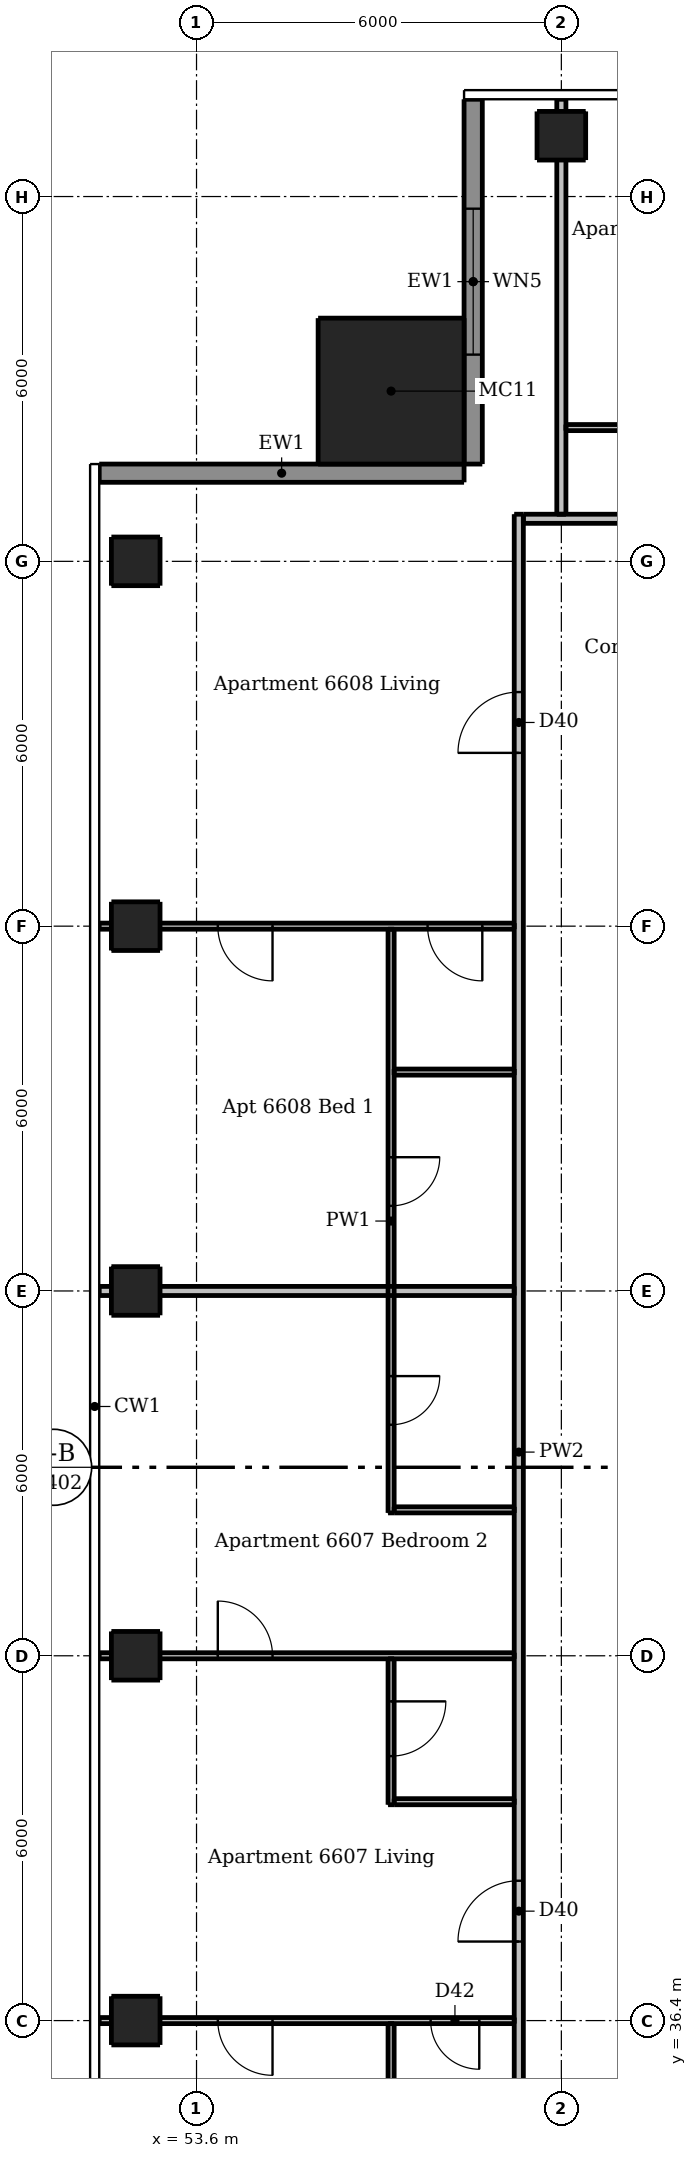
"""IFC4 building model, lengths in metres.
Left out: names, types, materials, properties, quantities, classifications, styles, units other than length and angle.
Written with IfcOpenShell. Run it as: python <this file> out.ifc"""

import sys

from ifc_helpers import new_model, si_unit, direction, frame, frame_2d, origin, origin_2d, place, context, subcontext, project, spatial, rectangle, extrude, element, fill, save


model = new_model("IFC4")
c1 = context("Model", 3, precision=1e-05, world=origin(), true_north=direction((0.0, 1.0)))
c2 = subcontext(c1, "Body", "Model", "MODEL_VIEW")
j1 = project(units=[si_unit("LENGTHUNIT", "METRE"), si_unit("PLANEANGLEUNIT", "RADIAN")], contexts=[c1])
p1 = place(None, origin())
s1 = spatial("IfcSite", under=j1, at=p1, CompositionType="ELEMENT")
p2 = place(p1, origin())
s2 = spatial("IfcBuilding", under=s1, at=p2, CompositionType="ELEMENT")
p3 = place(p2, frame((0.0, 0.0, 248.8)))
s3 = spatial("IfcBuildingStorey", under=s2, at=p3, CompositionType="ELEMENT", Elevation=248.8)
for number, where, z_axis, x_axis in (
    (1, (59.6, 67.4, 0.0), (0.0, 0.0, 1.0), (1.0, 0.0, 0.0)),
    (2, (52.6, 36.4, 0.0), (0.0, 0.0, 1.0), (1.0, 0.0, 0.0)),
    (3, (52.6, 42.4, 0.0), (0.0, 0.0, 1.0), (1.0, 0.0, 0.0)),
    (4, (52.6, 48.4, 0.0), (0.0, 0.0, 1.0), (1.0, 0.0, 0.0)),
    (5, (52.6, 54.4, 0.0), (0.0, 0.0, 1.0), (1.0, 0.0, 0.0)),
    (6, (52.6, 60.4, 0.0), (0.0, 0.0, 1.0), (1.0, 0.0, 0.0)),
):
    element("IfcColumn", number, at=place(p3, frame(where, z_axis=z_axis, x_axis=x_axis)), inside=s3, PredefinedType="COLUMN", context=c2, shape_type="SweptSolid", body=[
        extrude(rectangle(XDim=0.8, YDim=0.8, at=origin_2d()), origin(), (0.0, 0.0, 1.0), 3.05),
    ])
p4 = place(p3, frame((56.8, 63.2, 0.0), z_axis=(0.0, 0.0, 1.0), x_axis=(1.0, 0.0, 0.0)))
e7 = element("IfcColumn", 7, at=p4, inside=s3, PredefinedType="COLUMN", context=c2, shape_type="SweptSolid", body=[
    extrude(rectangle(XDim=2.4, YDim=2.4, at=origin_2d()), origin(), (0.0, 0.0, 1.0), 3.3),
])
p5 = place(p3, frame((58.15, 68.0, 0.0), z_axis=(0.0, 0.0, 1.0), x_axis=(0.0, -1.0, 0.0)))
e8 = element("IfcWall", 8, at=p5, inside=s3, PredefinedType="SOLIDWALL", context=c2, shape_type="SweptSolid", body=[
    extrude(rectangle(XDim=6.0, YDim=0.3, at=frame_2d((3.0, 0.0))), origin(), (0.0, 0.0, 1.0), 3.05),
])
p6 = place(p5, frame((1.8, 0.0, 0.15)))
e9 = element("IfcOpeningElement", 9, at=p6, cuts=e8, PredefinedType="OPENING", context=c2, shape_type="SweptSolid", body=[
    extrude(rectangle(XDim=2.4, YDim=2.1, at=frame_2d((1.2, 1.05))), frame((0.0, 0.16, 0.0), z_axis=(0.0, -1.0, 0.0), x_axis=(1.0, 0.0, 0.0)), (0.0, 0.0, 1.0), 0.32),
])
p7 = place(p3, frame((58.0, 61.85, 0.0), z_axis=(0.0, 0.0, 1.0), x_axis=(-1.0, 0.0, 0.0)))
e10 = element("IfcWall", 10, at=p7, inside=s3, PredefinedType="SOLIDWALL", context=c2, shape_type="SweptSolid", body=[
    extrude(rectangle(XDim=6.0, YDim=0.3, at=frame_2d((3.0, 0.0))), origin(), (0.0, 0.0, 1.0), 3.05),
])
p8 = place(p3, frame((56.8, 32.75, 0.0), z_axis=(0.0, 0.0, 1.0), x_axis=(0.0, 1.0, 0.0)))
e11 = element("IfcWall", 11, at=p8, inside=s3, PredefinedType="PARTITIONING", context=c2, shape_type="SweptSolid", body=[
    extrude(rectangle(XDim=3.6, YDim=0.1, at=frame_2d((1.8, 0.0))), origin(), (0.0, 0.0, 1.0), 3.05),
])
p9 = place(p3, frame((56.8, 42.35, 0.0), z_axis=(0.0, 0.0, 1.0), x_axis=(0.0, -1.0, 0.0)))
e12 = element("IfcWall", 12, at=p9, inside=s3, PredefinedType="PARTITIONING", context=c2, shape_type="SweptSolid", body=[
    extrude(rectangle(XDim=2.4, YDim=0.1, at=frame_2d((1.2, 0.0))), origin(), (0.0, 0.0, 1.0), 3.05),
])
p10 = place(p9, frame((0.7, 0.0, 0.0)))
e13 = element("IfcOpeningElement", 13, at=p10, cuts=e12, PredefinedType="OPENING", context=c2, shape_type="SweptSolid", body=[
    extrude(rectangle(XDim=0.9, YDim=2.1, at=frame_2d((0.45, 1.05))), frame((0.0, 0.06, 0.0), z_axis=(0.0, -1.0, 0.0), x_axis=(1.0, 0.0, 0.0)), (0.0, 0.0, 1.0), 0.12),
])
p11 = place(p3, frame((56.8, 54.35, 0.0), z_axis=(0.0, 0.0, 1.0), x_axis=(0.0, -1.0, 0.0)))
e14 = element("IfcWall", 14, at=p11, inside=s3, PredefinedType="PARTITIONING", context=c2, shape_type="SweptSolid", body=[
    extrude(rectangle(XDim=9.6, YDim=0.1, at=frame_2d((4.8, 0.0))), origin(), (0.0, 0.0, 1.0), 3.05),
])
p12 = place(p11, frame((7.35, 0.0, 0.0)))
e15 = element("IfcOpeningElement", 15, at=p12, cuts=e14, PredefinedType="OPENING", context=c2, shape_type="SweptSolid", body=[
    extrude(rectangle(XDim=0.8, YDim=2.1, at=frame_2d((0.4, 1.05))), frame((0.0, 0.06, 0.0), z_axis=(0.0, -1.0, 0.0), x_axis=(1.0, 0.0, 0.0)), (0.0, 0.0, 1.0), 0.12),
])
p13 = place(p11, frame((3.75, 0.0, 0.0)))
e16 = element("IfcOpeningElement", 16, at=p13, cuts=e14, PredefinedType="OPENING", context=c2, shape_type="SweptSolid", body=[
    extrude(rectangle(XDim=0.8, YDim=2.1, at=frame_2d((0.4, 1.05))), frame((0.0, 0.06, 0.0), z_axis=(0.0, -1.0, 0.0), x_axis=(1.0, 0.0, 0.0)), (0.0, 0.0, 1.0), 0.12),
])
p14 = place(p3, frame((59.675, 62.6, 0.0), z_axis=(0.0, 0.0, 1.0), x_axis=(1.0, 0.0, 0.0)))
e17 = element("IfcWall", 17, at=p14, inside=s3, PredefinedType="PARTITIONING", context=c2, shape_type="SweptSolid", body=[
    extrude(rectangle(XDim=17.85, YDim=0.1, at=frame_2d((8.925, 0.0))), origin(), (0.0, 0.0, 1.0), 3.05),
])
p15 = place(p14, frame((12.375, 0.0, 0.0)))
e18 = element("IfcOpeningElement", 18, at=p15, cuts=e17, PredefinedType="OPENING", context=c2, shape_type="SweptSolid", body=[
    extrude(rectangle(XDim=0.9, YDim=2.1, at=frame_2d((0.45, 1.05))), frame((0.0, 0.06, 0.0), z_axis=(0.0, -1.0, 0.0), x_axis=(1.0, 0.0, 0.0)), (0.0, 0.0, 1.0), 0.12),
])
p16 = place(p14, frame((16.275, 0.0, 0.0)))
e19 = element("IfcOpeningElement", 19, at=p16, cuts=e17, PredefinedType="OPENING", context=c2, shape_type="SweptSolid", body=[
    extrude(rectangle(XDim=0.9, YDim=2.1, at=frame_2d((0.45, 1.05))), frame((0.0, 0.06, 0.0), z_axis=(0.0, -1.0, 0.0), x_axis=(1.0, 0.0, 0.0)), (0.0, 0.0, 1.0), 0.12),
])
p17 = place(p14, frame((14.175, 0.0, 0.0)))
e20 = element("IfcOpeningElement", 20, at=p17, cuts=e17, PredefinedType="OPENING", context=c2, shape_type="SweptSolid", body=[
    extrude(rectangle(XDim=0.9, YDim=2.1, at=frame_2d((0.45, 1.05))), frame((0.0, 0.06, 0.0), z_axis=(0.0, -1.0, 0.0), x_axis=(1.0, 0.0, 0.0)), (0.0, 0.0, 1.0), 0.12),
])
p18 = place(p14, frame((1.275, 0.0, 0.0)))
e21 = element("IfcOpeningElement", 21, at=p18, cuts=e17, PredefinedType="OPENING", context=c2, shape_type="SweptSolid", body=[
    extrude(rectangle(XDim=0.9, YDim=2.1, at=frame_2d((0.45, 1.05))), frame((0.0, 0.06, 0.0), z_axis=(0.0, -1.0, 0.0), x_axis=(1.0, 0.0, 0.0)), (0.0, 0.0, 1.0), 0.12),
])
p19 = place(p14, frame((7.275, 0.0, 0.0)))
e22 = element("IfcOpeningElement", 22, at=p19, cuts=e17, PredefinedType="OPENING", context=c2, shape_type="SweptSolid", body=[
    extrude(rectangle(XDim=0.9, YDim=2.1, at=frame_2d((0.45, 1.05))), frame((0.0, 0.06, 0.0), z_axis=(0.0, -1.0, 0.0), x_axis=(1.0, 0.0, 0.0)), (0.0, 0.0, 1.0), 0.12),
])
p20 = place(p14, frame((4.325, 0.0, 0.0)))
e23 = element("IfcOpeningElement", 23, at=p20, cuts=e17, PredefinedType="OPENING", context=c2, shape_type="SweptSolid", body=[
    extrude(rectangle(XDim=0.8, YDim=2.1, at=frame_2d((0.4, 1.05))), frame((0.0, 0.06, 0.0), z_axis=(0.0, -1.0, 0.0), x_axis=(1.0, 0.0, 0.0)), (0.0, 0.0, 1.0), 0.12),
])
p21 = place(p14, frame((10.325, 0.0, 0.0)))
e24 = element("IfcOpeningElement", 24, at=p21, cuts=e17, PredefinedType="OPENING", context=c2, shape_type="SweptSolid", body=[
    extrude(rectangle(XDim=0.8, YDim=2.1, at=frame_2d((0.4, 1.05))), frame((0.0, 0.06, 0.0), z_axis=(0.0, -1.0, 0.0), x_axis=(1.0, 0.0, 0.0)), (0.0, 0.0, 1.0), 0.12),
])
p22 = place(p3, frame((58.825, 54.4, 0.0), z_axis=(0.0, 0.0, 1.0), x_axis=(-1.0, 0.0, 0.0)))
e25 = element("IfcWall", 25, at=p22, inside=s3, PredefinedType="PARTITIONING", context=c2, shape_type="SweptSolid", body=[
    extrude(rectangle(XDim=6.825, YDim=0.1, at=frame_2d((3.413, 0.0))), origin(), (0.0, 0.0, 1.0), 2.516),
])
p23 = place(p22, frame((0.525, 0.0, 0.0)))
e26 = element("IfcOpeningElement", 26, at=p23, cuts=e25, PredefinedType="OPENING", context=c2, shape_type="SweptSolid", body=[
    extrude(rectangle(XDim=0.9, YDim=2.1, at=frame_2d((0.45, 1.05))), frame((0.0, 0.06, 0.0), z_axis=(0.0, -1.0, 0.0), x_axis=(1.0, 0.0, 0.0)), (0.0, 0.0, 1.0), 0.12),
])
p24 = place(p22, frame((3.975, 0.0, 0.0)))
e27 = element("IfcOpeningElement", 27, at=p24, cuts=e25, PredefinedType="OPENING", context=c2, shape_type="SweptSolid", body=[
    extrude(rectangle(XDim=0.9, YDim=2.1, at=frame_2d((0.45, 1.05))), frame((0.0, 0.06, 0.0), z_axis=(0.0, -1.0, 0.0), x_axis=(1.0, 0.0, 0.0)), (0.0, 0.0, 1.0), 0.12),
])
for number, where, z_axis, x_axis in (
    (28, (56.85, 52.0, 0.0), (0.0, 0.0, 1.0), (1.0, 0.0, 0.0)),
    (29, (56.85, 44.8, 0.0), (0.0, 0.0, 1.0), (1.0, 0.0, 0.0)),
):
    element("IfcWall", number, at=place(p3, frame(where, z_axis=z_axis, x_axis=x_axis)), inside=s3, PredefinedType="PARTITIONING", context=c2, shape_type="SweptSolid", body=[
        extrude(rectangle(XDim=1.975, YDim=0.1, at=frame_2d((0.987, 0.0))), origin(), (0.0, 0.0, 1.0), 3.05),
    ])
p25 = place(p3, frame((52.0, 42.4, 0.0), z_axis=(0.0, 0.0, 1.0), x_axis=(1.0, 0.0, 0.0)))
e30 = element("IfcWall", 30, at=p25, inside=s3, PredefinedType="PARTITIONING", context=c2, shape_type="SweptSolid", body=[
    extrude(rectangle(XDim=6.825, YDim=0.1, at=frame_2d((3.413, 0.0))), origin(), (0.0, 0.0, 1.0), 2.516),
])
p26 = place(p25, frame((1.95, 0.0, 0.0)))
e31 = element("IfcOpeningElement", 31, at=p26, cuts=e30, PredefinedType="OPENING", context=c2, shape_type="SweptSolid", body=[
    extrude(rectangle(XDim=0.9, YDim=2.1, at=frame_2d((0.45, 1.05))), frame((0.0, 0.06, 0.0), z_axis=(0.0, -1.0, 0.0), x_axis=(1.0, 0.0, 0.0)), (0.0, 0.0, 1.0), 0.12),
])
p27 = place(p3, frame((56.85, 40.0, 0.0), z_axis=(0.0, 0.0, 1.0), x_axis=(1.0, 0.0, 0.0)))
e32 = element("IfcWall", 32, at=p27, inside=s3, PredefinedType="PARTITIONING", context=c2, shape_type="SweptSolid", body=[
    extrude(rectangle(XDim=1.975, YDim=0.1, at=frame_2d((0.987, 0.0))), origin(), (0.0, 0.0, 1.0), 3.05),
])
p28 = place(p3, frame((58.825, 36.4, 0.0), z_axis=(0.0, 0.0, 1.0), x_axis=(-1.0, 0.0, 0.0)))
e33 = element("IfcWall", 33, at=p28, inside=s3, PredefinedType="PARTITIONING", context=c2, shape_type="SweptSolid", body=[
    extrude(rectangle(XDim=6.825, YDim=0.1, at=frame_2d((3.413, 0.0))), origin(), (0.0, 0.0, 1.0), 2.516),
])
p29 = place(p28, frame((3.975, 0.0, 0.0)))
e34 = element("IfcOpeningElement", 34, at=p29, cuts=e33, PredefinedType="OPENING", context=c2, shape_type="SweptSolid", body=[
    extrude(rectangle(XDim=0.9, YDim=2.1, at=frame_2d((0.45, 1.05))), frame((0.0, 0.06, 0.0), z_axis=(0.0, -1.0, 0.0), x_axis=(1.0, 0.0, 0.0)), (0.0, 0.0, 1.0), 0.12),
])
p30 = place(p28, frame((0.575, 0.0, 0.0)))
e35 = element("IfcOpeningElement", 35, at=p30, cuts=e33, PredefinedType="OPENING", context=c2, shape_type="SweptSolid", body=[
    extrude(rectangle(XDim=0.8, YDim=2.1, at=frame_2d((0.4, 1.05))), frame((0.0, 0.06, 0.0), z_axis=(0.0, -1.0, 0.0), x_axis=(1.0, 0.0, 0.0)), (0.0, 0.0, 1.0), 0.12),
])
p31 = place(p3, frame((58.9, 30.325, 0.0), z_axis=(0.0, 0.0, 1.0), x_axis=(0.0, 1.0, 0.0)))
e36 = element("IfcWall", 36, at=p31, inside=s3, PredefinedType="PARTITIONING", context=c2, shape_type="SweptSolid", body=[
    extrude(rectangle(XDim=30.85, YDim=0.15, at=frame_2d((15.425, 0.0))), origin(), (0.0, 0.0, 1.0), 3.05),
])
p32 = place(p31, frame((7.375, 0.0, 0.0)))
e37 = element("IfcOpeningElement", 37, at=p32, cuts=e36, PredefinedType="OPENING", context=c2, shape_type="SweptSolid", body=[
    extrude(rectangle(XDim=1.0, YDim=2.1, at=frame_2d((0.5, 1.05))), frame((0.0, 0.085, 0.0), z_axis=(0.0, -1.0, 0.0), x_axis=(1.0, 0.0, 0.0)), (0.0, 0.0, 1.0), 0.17),
])
p33 = place(p31, frame((26.925, 0.0, 0.0)))
e38 = element("IfcOpeningElement", 38, at=p33, cuts=e36, PredefinedType="OPENING", context=c2, shape_type="SweptSolid", body=[
    extrude(rectangle(XDim=1.0, YDim=2.1, at=frame_2d((0.5, 1.05))), frame((0.0, 0.085, 0.0), z_axis=(0.0, -1.0, 0.0), x_axis=(1.0, 0.0, 0.0)), (0.0, 0.0, 1.0), 0.17),
])
p34 = place(p3, frame((59.6, 61.175, 0.0), z_axis=(0.0, 0.0, 1.0), x_axis=(0.0, 1.0, 0.0)))
e39 = element("IfcWall", 39, at=p34, inside=s3, PredefinedType="PARTITIONING", context=c2, shape_type="SweptSolid", body=[
    extrude(rectangle(XDim=6.825, YDim=0.15, at=frame_2d((3.413, 0.0))), origin(), (0.0, 0.0, 1.0), 2.51),
])
p35 = place(p3, frame((58.975, 61.1, 0.0), z_axis=(0.0, 0.0, 1.0), x_axis=(1.0, 0.0, 0.0)))
e40 = element("IfcWall", 40, at=p35, inside=s3, PredefinedType="PARTITIONING", context=c2, shape_type="SweptSolid", body=[
    extrude(rectangle(XDim=29.25, YDim=0.15, at=frame_2d((14.625, 0.0))), origin(), (0.0, 0.0, 1.0), 3.05),
])
p36 = place(p35, frame((9.125, 0.0, 0.0)))
e41 = element("IfcOpeningElement", 41, at=p36, cuts=e40, PredefinedType="OPENING", context=c2, shape_type="SweptSolid", body=[
    extrude(rectangle(XDim=1.0, YDim=2.1, at=frame_2d((0.5, 1.05))), frame((0.0, 0.085, 0.0), z_axis=(0.0, -1.0, 0.0), x_axis=(1.0, 0.0, 0.0)), (0.0, 0.0, 1.0), 0.17),
])
p37 = place(p35, frame((26.475, 0.0, 0.0)))
e42 = element("IfcOpeningElement", 42, at=p37, cuts=e40, PredefinedType="OPENING", context=c2, shape_type="SweptSolid", body=[
    extrude(rectangle(XDim=1.0, YDim=2.1, at=frame_2d((0.5, 1.05))), frame((0.0, 0.085, 0.0), z_axis=(0.0, -1.0, 0.0), x_axis=(1.0, 0.0, 0.0)), (0.0, 0.0, 1.0), 0.17),
])
p38 = place(p3, frame((52.0, 48.4, 0.0), z_axis=(0.0, 0.0, 1.0), x_axis=(1.0, 0.0, 0.0)))
e43 = element("IfcWall", 43, at=p38, inside=s3, PredefinedType="PARTITIONING", context=c2, shape_type="SweptSolid", body=[
    extrude(rectangle(XDim=6.825, YDim=0.15, at=frame_2d((3.413, 0.0))), origin(), (0.0, 0.0, 1.0), 2.516),
])
p39 = place(p6, origin())
e44 = element("IfcWindow", 44, at=p39, inside=s3, PartitioningType="DOUBLE_PANEL_VERTICAL", PredefinedType="WINDOW", context=c2, shape_type="SweptSolid", body=[
    extrude(rectangle(XDim=2.4, YDim=2.1, at=frame_2d((1.2, 1.05))), frame((0.0, 0.03, 0.0), z_axis=(0.0, -1.0, 0.0), x_axis=(1.0, 0.0, 0.0)), (0.0, 0.0, 1.0), 0.06),
])
fill(e9, e44)
p40 = place(p32, origin())
e45 = element("IfcDoor", 45, at=p40, inside=s3, OperationType="SINGLE_SWING_LEFT", PredefinedType="DOOR", context=c2, shape_type="SweptSolid", body=[
    extrude(rectangle(XDim=1.0, YDim=2.1, at=frame_2d((0.5, 1.05))), frame((0.0, 0.025, 0.0), z_axis=(0.0, -1.0, 0.0), x_axis=(1.0, 0.0, 0.0)), (0.0, 0.0, 1.0), 0.05),
])
fill(e37, e45)
p41 = place(p10, origin())
e46 = element("IfcDoor", 46, at=p41, inside=s3, OperationType="SINGLE_SWING_LEFT", PredefinedType="DOOR", context=c2, shape_type="SweptSolid", body=[
    extrude(rectangle(XDim=0.9, YDim=2.1, at=frame_2d((0.45, 1.05))), frame((0.0, 0.025, 0.0), z_axis=(0.0, -1.0, 0.0), x_axis=(1.0, 0.0, 0.0)), (0.0, 0.0, 1.0), 0.05),
])
fill(e13, e46)
p42 = place(p29, origin())
e47 = element("IfcDoor", 47, at=p42, inside=s3, OperationType="SINGLE_SWING_LEFT", PredefinedType="DOOR", context=c2, shape_type="SweptSolid", body=[
    extrude(rectangle(XDim=0.9, YDim=2.1, at=frame_2d((0.45, 1.05))), frame((0.0, 0.025, 0.0), z_axis=(0.0, -1.0, 0.0), x_axis=(1.0, 0.0, 0.0)), (0.0, 0.0, 1.0), 0.05),
])
fill(e34, e47)
p43 = place(p30, origin())
e48 = element("IfcDoor", 48, at=p43, inside=s3, OperationType="SINGLE_SWING_LEFT", PredefinedType="DOOR", context=c2, shape_type="SweptSolid", body=[
    extrude(rectangle(XDim=0.8, YDim=2.1, at=frame_2d((0.4, 1.05))), frame((0.0, 0.025, 0.0), z_axis=(0.0, -1.0, 0.0), x_axis=(1.0, 0.0, 0.0)), (0.0, 0.0, 1.0), 0.05),
])
fill(e35, e48)
p44 = place(p26, origin())
e49 = element("IfcDoor", 49, at=p44, inside=s3, OperationType="SINGLE_SWING_LEFT", PredefinedType="DOOR", context=c2, shape_type="SweptSolid", body=[
    extrude(rectangle(XDim=0.9, YDim=2.1, at=frame_2d((0.45, 1.05))), frame((0.0, 0.025, 0.0), z_axis=(0.0, -1.0, 0.0), x_axis=(1.0, 0.0, 0.0)), (0.0, 0.0, 1.0), 0.05),
])
fill(e31, e49)
p45 = place(p12, origin())
e50 = element("IfcDoor", 50, at=p45, inside=s3, OperationType="SINGLE_SWING_LEFT", PredefinedType="DOOR", context=c2, shape_type="SweptSolid", body=[
    extrude(rectangle(XDim=0.8, YDim=2.1, at=frame_2d((0.4, 1.05))), frame((0.0, 0.025, 0.0), z_axis=(0.0, -1.0, 0.0), x_axis=(1.0, 0.0, 0.0)), (0.0, 0.0, 1.0), 0.05),
])
fill(e15, e50)
p46 = place(p33, origin())
e51 = element("IfcDoor", 51, at=p46, inside=s3, OperationType="SINGLE_SWING_LEFT", PredefinedType="DOOR", context=c2, shape_type="SweptSolid", body=[
    extrude(rectangle(XDim=1.0, YDim=2.1, at=frame_2d((0.5, 1.05))), frame((0.0, 0.025, 0.0), z_axis=(0.0, -1.0, 0.0), x_axis=(1.0, 0.0, 0.0)), (0.0, 0.0, 1.0), 0.05),
])
fill(e38, e51)
p47 = place(p23, origin())
e52 = element("IfcDoor", 52, at=p47, inside=s3, OperationType="SINGLE_SWING_LEFT", PredefinedType="DOOR", context=c2, shape_type="SweptSolid", body=[
    extrude(rectangle(XDim=0.9, YDim=2.1, at=frame_2d((0.45, 1.05))), frame((0.0, 0.025, 0.0), z_axis=(0.0, -1.0, 0.0), x_axis=(1.0, 0.0, 0.0)), (0.0, 0.0, 1.0), 0.05),
])
fill(e26, e52)
p48 = place(p24, origin())
e53 = element("IfcDoor", 53, at=p48, inside=s3, OperationType="SINGLE_SWING_LEFT", PredefinedType="DOOR", context=c2, shape_type="SweptSolid", body=[
    extrude(rectangle(XDim=0.9, YDim=2.1, at=frame_2d((0.45, 1.05))), frame((0.0, 0.025, 0.0), z_axis=(0.0, -1.0, 0.0), x_axis=(1.0, 0.0, 0.0)), (0.0, 0.0, 1.0), 0.05),
])
fill(e27, e53)
p49 = place(p13, origin())
e54 = element("IfcDoor", 54, at=p49, inside=s3, OperationType="SINGLE_SWING_LEFT", PredefinedType="DOOR", context=c2, shape_type="SweptSolid", body=[
    extrude(rectangle(XDim=0.8, YDim=2.1, at=frame_2d((0.4, 1.05))), frame((0.0, 0.025, 0.0), z_axis=(0.0, -1.0, 0.0), x_axis=(1.0, 0.0, 0.0)), (0.0, 0.0, 1.0), 0.05),
])
fill(e16, e54)
save(model, sys.argv[1])
